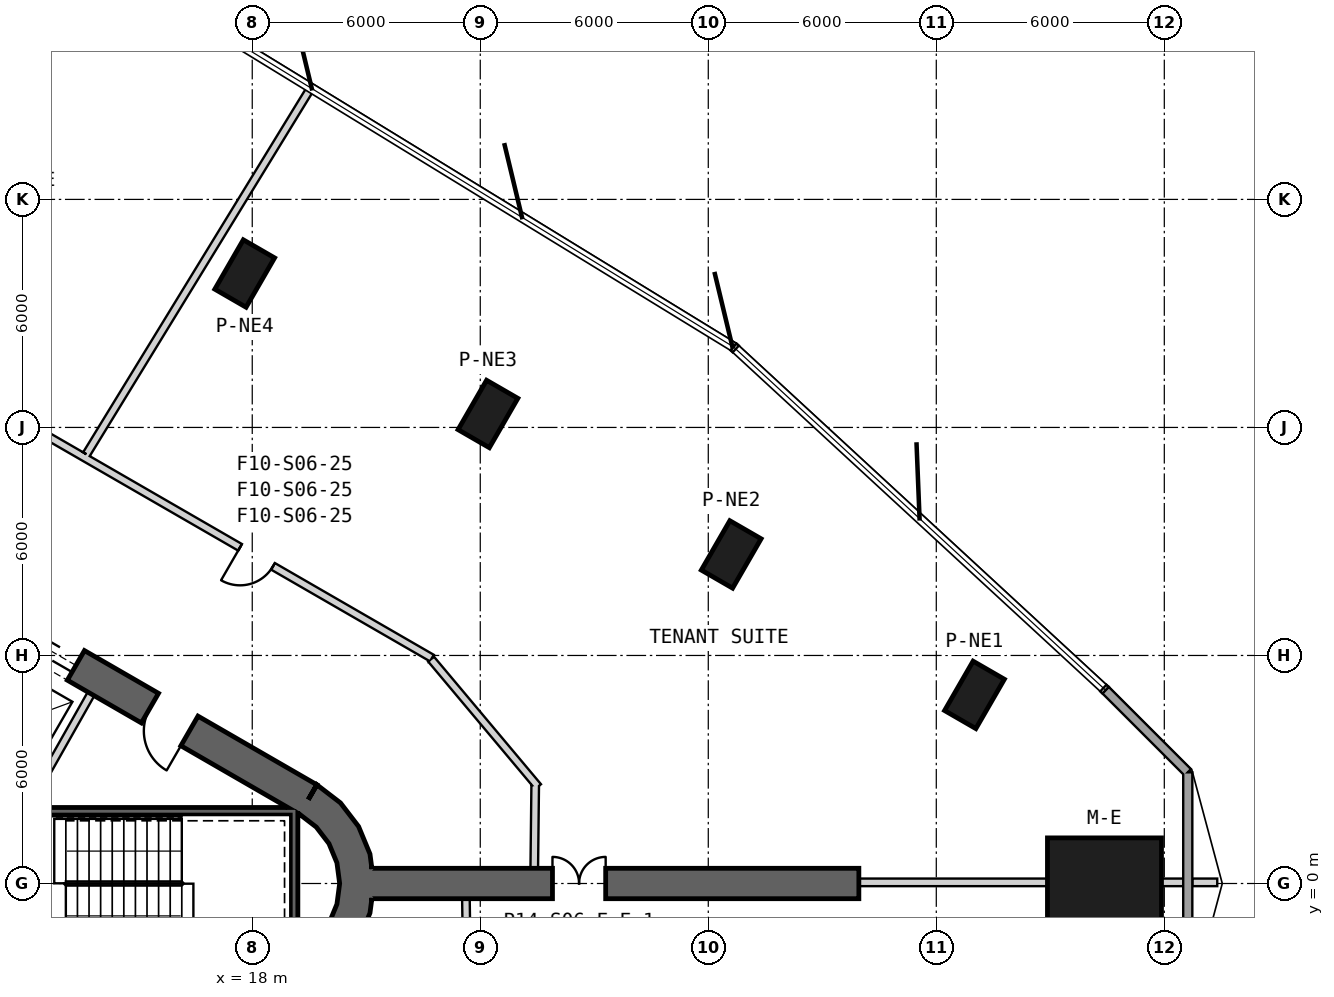
"""IFC4 building model, lengths in metres.
Left out: names, types, materials, properties, quantities, classifications, styles, units other than length and angle.
Written with IfcOpenShell. Run it as: python <this file> out.ifc"""

import sys

from ifc_helpers import new_model, si_unit, direction, frame, frame_2d, origin, origin_2d, place, context, subcontext, project, spatial, polyline, rectangle, outline, extrude, element, fill, save


model = new_model("IFC4")
c1 = context("Model", 3, precision=1e-05, world=origin(), true_north=direction((0.0, 1.0)))
c2 = subcontext(c1, "Body", "Model", "MODEL_VIEW")
j1 = project(units=[si_unit("LENGTHUNIT", "METRE"), si_unit("PLANEANGLEUNIT", "RADIAN")], contexts=[c1])
p1 = place(None, origin())
s1 = spatial("IfcSite", under=j1, at=p1, CompositionType="ELEMENT")
p2 = place(p1, origin())
s2 = spatial("IfcBuilding", under=s1, at=p2, CompositionType="ELEMENT")
p3 = place(p2, frame((0.0, 0.0, 119.3)))
s3 = spatial("IfcBuildingStorey", under=s2, at=p3, CompositionType="ELEMENT", Elevation=119.3)
p4 = place(p3, frame((40.425, 0.0, 0.0), z_axis=(0.0, 0.0, 1.0), x_axis=(1.0, 0.0, 0.0)))
e1 = element("IfcColumn", 1, at=p4, inside=s3, PredefinedType="COLUMN", context=c2, shape_type="SweptSolid", body=[
    extrude(rectangle(XDim=3.0, YDim=2.4, at=origin_2d()), origin(), (0.0, 0.0, 1.0), 4.1),
])
for number, where, z_axis, x_axis in (
    (2, (37.005, 4.963, 0.0), (0.0, 0.0, 1.0), (0.5, 0.866, 0.0)),
    (3, (30.604, 8.658, 0.0), (0.0, 0.0, 1.0), (0.5, 0.866, 0.0)),
    (4, (24.202, 12.354, 0.0), (0.0, 0.0, 1.0), (0.5, 0.866, 0.0)),
    (5, (17.801, 16.05, 0.0), (0.0, 0.0, 1.0), (0.5, 0.866, 0.0)),
):
    element("IfcColumn", number, at=place(p3, frame(where, z_axis=z_axis, x_axis=x_axis)), inside=s3, PredefinedType="COLUMN", context=c2, shape_type="SweptSolid", body=[
        extrude(rectangle(XDim=1.5, YDim=0.95, at=origin_2d()), origin(), (0.0, 0.0, 1.0), 4.1),
    ])
p5 = place(p3, frame((19.475, 2.208, 0.0), z_axis=(0.0, 0.0, 1.0), x_axis=(-0.866028369851, 0.499994862586, 0.0)))
e6 = element("IfcWall", 6, at=p5, inside=s3, PredefinedType="SHEAR", context=c2, shape_type="SweptSolid", body=[
    extrude(rectangle(XDim=31.523, YDim=0.9, at=frame_2d((15.762, 0.0))), origin(), (0.0, 0.0, 1.0), 4.1),
])
p6 = place(p5, frame((7.062, 0.0, 0.0)))
e7 = element("IfcOpeningElement", 7, at=p6, cuts=e6, PredefinedType="OPENING", context=c2, shape_type="SweptSolid", body=[
    extrude(rectangle(XDim=1.2, YDim=2.4, at=frame_2d((0.6, 1.2))), frame((0.0, 0.46, 0.0), z_axis=(0.0, -1.0, 0.0), x_axis=(1.0, 0.0, 0.0)), (0.0, 0.0, 1.0), 0.92),
])
p7 = place(p5, frame((9.762, 0.0, 0.0)))
e8 = element("IfcOpeningElement", 8, at=p7, cuts=e6, PredefinedType="OPENING", context=c2, shape_type="SweptSolid", body=[
    extrude(rectangle(XDim=1.2, YDim=2.4, at=frame_2d((0.6, 1.2))), frame((0.0, 0.46, 0.0), z_axis=(0.0, -1.0, 0.0), x_axis=(1.0, 0.0, 0.0)), (0.0, 0.0, 1.0), 0.92),
])
p8 = place(p5, frame((12.462, 0.0, 0.0)))
e9 = element("IfcOpeningElement", 9, at=p8, cuts=e6, PredefinedType="OPENING", context=c2, shape_type="SweptSolid", body=[
    extrude(rectangle(XDim=1.2, YDim=2.4, at=frame_2d((0.6, 1.2))), frame((0.0, 0.46, 0.0), z_axis=(0.0, -1.0, 0.0), x_axis=(1.0, 0.0, 0.0)), (0.0, 0.0, 1.0), 0.92),
])
p9 = place(p5, frame((15.162, 0.0, 0.0)))
e10 = element("IfcOpeningElement", 10, at=p9, cuts=e6, PredefinedType="OPENING", context=c2, shape_type="SweptSolid", body=[
    extrude(rectangle(XDim=1.2, YDim=2.4, at=frame_2d((0.6, 1.2))), frame((0.0, 0.46, 0.0), z_axis=(0.0, -1.0, 0.0), x_axis=(1.0, 0.0, 0.0)), (0.0, 0.0, 1.0), 0.92),
])
p10 = place(p5, frame((17.862, 0.0, 0.0)))
e11 = element("IfcOpeningElement", 11, at=p10, cuts=e6, PredefinedType="OPENING", context=c2, shape_type="SweptSolid", body=[
    extrude(rectangle(XDim=1.2, YDim=2.4, at=frame_2d((0.6, 1.2))), frame((0.0, 0.46, 0.0), z_axis=(0.0, -1.0, 0.0), x_axis=(1.0, 0.0, 0.0)), (0.0, 0.0, 1.0), 0.92),
])
p11 = place(p5, frame((20.562, 0.0, 0.0)))
e12 = element("IfcOpeningElement", 12, at=p11, cuts=e6, PredefinedType="OPENING", context=c2, shape_type="SweptSolid", body=[
    extrude(rectangle(XDim=1.2, YDim=2.4, at=frame_2d((0.6, 1.2))), frame((0.0, 0.46, 0.0), z_axis=(0.0, -1.0, 0.0), x_axis=(1.0, 0.0, 0.0)), (0.0, 0.0, 1.0), 0.92),
])
p12 = place(p5, frame((23.262, 0.0, 0.0)))
e13 = element("IfcOpeningElement", 13, at=p12, cuts=e6, PredefinedType="OPENING", context=c2, shape_type="SweptSolid", body=[
    extrude(rectangle(XDim=1.2, YDim=2.4, at=frame_2d((0.6, 1.2))), frame((0.0, 0.46, 0.0), z_axis=(0.0, -1.0, 0.0), x_axis=(1.0, 0.0, 0.0)), (0.0, 0.0, 1.0), 0.92),
])
p13 = place(p5, frame((3.612, 0.0, 0.0)))
e14 = element("IfcOpeningElement", 14, at=p13, cuts=e6, PredefinedType="OPENING", context=c2, shape_type="SweptSolid", body=[
    extrude(rectangle(XDim=1.2, YDim=2.4, at=frame_2d((0.6, 1.2))), frame((0.0, 0.46, 0.0), z_axis=(0.0, -1.0, 0.0), x_axis=(1.0, 0.0, 0.0)), (0.0, 0.0, 1.0), 0.92),
])
p14 = place(p5, frame((26.712, 0.0, 0.0)))
e15 = element("IfcOpeningElement", 15, at=p14, cuts=e6, PredefinedType="OPENING", context=c2, shape_type="SweptSolid", body=[
    extrude(rectangle(XDim=1.2, YDim=2.4, at=frame_2d((0.6, 1.2))), frame((0.0, 0.46, 0.0), z_axis=(0.0, -1.0, 0.0), x_axis=(1.0, 0.0, 0.0)), (0.0, 0.0, 1.0), 0.92),
])
p15 = place(p3, origin())
e16 = element("IfcWall", 16, at=p15, inside=s3, PredefinedType="SHEAR", context=c2, shape_type="SweptSolid", body=[
    extrude(outline(polyline([(19.7, -2.598), (20.321, -2.121), (20.798, -1.5), (21.098, -0.777), (21.2, 0.0), (21.098, 0.777), (20.798, 1.5), (20.321, 2.121), (19.7, 2.598), (19.25, 1.819), (19.685, 1.485), (20.019, 1.05), (20.229, 0.543), (20.3, 0.0), (20.229, -0.543), (20.019, -1.05), (19.685, -1.485), (19.25, -1.819), (19.7, -2.598)])), origin(), (0.0, 0.0, 1.0), 4.1),
])
p16 = place(p3, frame((21.15, 0.0, 0.0), z_axis=(0.0, 0.0, 1.0), x_axis=(1.0, 0.0, 0.0)))
e17 = element("IfcWall", 17, at=p16, inside=s3, PredefinedType="SHEAR", context=c2, shape_type="SweptSolid", body=[
    extrude(rectangle(XDim=12.812, YDim=0.8, at=frame_2d((6.406, 0.0))), origin(), (0.0, 0.0, 1.0), 4.1),
])
p17 = place(p16, frame((4.75, 0.0, 0.0)))
e18 = element("IfcOpeningElement", 18, at=p17, cuts=e17, PredefinedType="OPENING", context=c2, shape_type="SweptSolid", body=[
    extrude(rectangle(XDim=1.4, YDim=2.4, at=frame_2d((0.7, 1.2))), frame((0.0, 0.41, 0.0), z_axis=(0.0, -1.0, 0.0), x_axis=(1.0, 0.0, 0.0)), (0.0, 0.0, 1.0), 0.82),
])
p18 = place(p3, frame((42.617, -2.925, 0.0), z_axis=(0.0, 0.0, 1.0), x_axis=(0.0, 1.0, 0.0)))
e19 = element("IfcWall", 19, at=p18, inside=s3, PredefinedType="SOLIDWALL", context=c2, shape_type="SweptSolid", body=[
    extrude(rectangle(XDim=5.851, YDim=0.24, at=frame_2d((2.925, 0.0))), origin(), (0.0, 0.0, 1.0), 3.8),
])
p19 = place(p3, frame((42.617, 2.925, 0.0), z_axis=(0.0, 0.0, 1.0), x_axis=(-0.707106781187, 0.707106781187, 0.0)))
e20 = element("IfcWall", 20, at=p19, inside=s3, PredefinedType="SOLIDWALL", context=c2, shape_type="SweptSolid", body=[
    extrude(rectangle(XDim=3.058, YDim=0.24, at=frame_2d((1.529, 0.0))), origin(), (0.0, 0.0, 1.0), 3.8),
])
p20 = place(p3, frame((12.11, 2.073, 0.0), z_axis=(0.0, 0.0, 1.0), x_axis=(0.49196600604, 0.870614408852, 0.0)))
e21 = element("IfcWall", 21, at=p20, inside=s3, PredefinedType="PLUMBINGWALL", context=c2, shape_type="SweptSolid", body=[
    extrude(rectangle(XDim=3.35, YDim=0.2, at=frame_2d((1.675, 0.0))), origin(), (0.0, 0.0, 1.0), 3.8),
])
p21 = place(p3, frame((19.2, 1.9, -0.3), z_axis=(0.0, 0.0, 1.0), x_axis=(-1.0, 0.0, 0.0)))
e22 = element("IfcWall", 22, at=p21, inside=s3, PredefinedType="SHEAR", context=c2, shape_type="SweptSolid", body=[
    extrude(rectangle(XDim=8.1, YDim=0.2, at=frame_2d((4.05, 0.0))), origin(), (0.0, 0.0, 1.0), 4.1),
])
p22 = place(p3, frame((19.1, -2.0, -0.3), z_axis=(0.0, 0.0, 1.0), x_axis=(0.0, 1.0, 0.0)))
e23 = element("IfcWall", 23, at=p22, inside=s3, PredefinedType="SHEAR", context=c2, shape_type="SweptSolid", body=[
    extrude(rectangle(XDim=3.8, YDim=0.2, at=frame_2d((1.9, 0.0))), origin(), (0.0, 0.0, 1.0), 4.1),
])
p23 = place(p3, frame((22.727, 5.931, 0.0), z_axis=(0.0, 0.0, 1.0), x_axis=(-0.866024609098, 0.500001376435, 0.0)))
e24 = element("IfcWall", 24, at=p23, inside=s3, PredefinedType="PARTITIONING", context=c2, shape_type="SweptSolid", body=[
    extrude(rectangle(XDim=26.847, YDim=0.2, at=frame_2d((13.424, 0.0))), origin(), (0.0, 0.0, 1.0), 2.98),
])
p24 = place(p23, frame((16.578, 0.0, 0.0)))
e25 = element("IfcOpeningElement", 25, at=p24, cuts=e24, PredefinedType="OPENING", context=c2, shape_type="SweptSolid", body=[
    extrude(rectangle(XDim=1.0, YDim=2.1, at=frame_2d((0.5, 1.05))), frame((0.0, 0.11, 0.0), z_axis=(0.0, -1.0, 0.0), x_axis=(1.0, 0.0, 0.0)), (0.0, 0.0, 1.0), 0.22),
])
p25 = place(p23, frame((4.829, 0.0, 0.0)))
e26 = element("IfcOpeningElement", 26, at=p25, cuts=e24, PredefinedType="OPENING", context=c2, shape_type="SweptSolid", body=[
    extrude(rectangle(XDim=1.0, YDim=2.1, at=frame_2d((0.5, 1.05))), frame((0.0, 0.11, 0.0), z_axis=(0.0, -1.0, 0.0), x_axis=(1.0, 0.0, 0.0)), (0.0, 0.0, 1.0), 0.22),
])
p26 = place(p3, frame((25.521, 2.548, 0.0), z_axis=(0.0, 0.0, 1.0), x_axis=(-0.642784253626, 0.766047259176, 0.0)))
e27 = element("IfcWall", 27, at=p26, inside=s3, PredefinedType="PARTITIONING", context=c2, shape_type="SweptSolid", body=[
    extrude(rectangle(XDim=4.381, YDim=0.2, at=frame_2d((2.19, 0.0))), origin(), (0.0, 0.0, 1.0), 2.88),
])
p27 = place(p3, frame((25.421, 0.4, 0.0), z_axis=(0.0, 0.0, 1.0), x_axis=(0.011376843137, 0.999935281626, 0.0)))
e28 = element("IfcWall", 28, at=p27, inside=s3, PredefinedType="PARTITIONING", context=c2, shape_type="SweptSolid", body=[
    extrude(rectangle(XDim=2.189, YDim=0.2, at=frame_2d((1.094, 0.0))), origin(), (0.0, 0.0, 1.0), 3.8),
])
p28 = place(p3, frame((23.648, -2.098, 0.0), z_axis=(0.0, 0.0, 1.0), x_axis=(-0.015095332307, 0.99988605898, 0.0)))
e29 = element("IfcWall", 29, at=p28, inside=s3, PredefinedType="PARTITIONING", context=c2, shape_type="SweptSolid", body=[
    extrude(rectangle(XDim=1.698, YDim=0.2, at=frame_2d((0.849, 0.0))), origin(), (0.0, 0.0, 1.0), 3.8),
])
p29 = place(p3, frame((19.541, 20.933, 0.0), z_axis=(0.0, 0.0, 1.0), x_axis=(-0.522401997829, -0.852699333097, 0.0)))
e30 = element("IfcWall", 30, at=p29, inside=s3, PredefinedType="PARTITIONING", context=c2, shape_type="SweptSolid", body=[
    extrude(rectangle(XDim=11.303, YDim=0.2, at=frame_2d((5.652, 0.0))), origin(), (0.0, 0.0, 1.0), 3.08),
])
p30 = place(p3, frame((43.393, 0.03, 0.0), z_axis=(0.0, 0.0, 1.0), x_axis=(-1.0, 0.0, 0.0)))
e31 = element("IfcWall", 31, at=p30, inside=s3, PredefinedType="PARTITIONING", context=c2, shape_type="SweptSolid", body=[
    extrude(rectangle(XDim=0.656, YDim=0.2, at=frame_2d((0.328, 0.0))), origin(), (0.0, 0.0, 1.0), 3.8),
])
p31 = place(p3, frame((42.497, 0.03, 0.0), z_axis=(0.0, 0.0, 1.0), x_axis=(-1.0, 0.0, 0.0)))
e32 = element("IfcWall", 32, at=p31, inside=s3, PredefinedType="PARTITIONING", context=c2, shape_type="SweptSolid", body=[
    extrude(rectangle(XDim=0.572, YDim=0.2, at=frame_2d((0.286, 0.0))), origin(), (0.0, 0.0, 1.0), 3.8),
])
p32 = place(p3, frame((38.925, 0.03, 0.0), z_axis=(0.0, 0.0, 1.0), x_axis=(-1.0, 0.0, 0.0)))
e33 = element("IfcWall", 33, at=p32, inside=s3, PredefinedType="PARTITIONING", context=c2, shape_type="SweptSolid", body=[
    extrude(rectangle(XDim=4.963, YDim=0.2, at=frame_2d((2.481, 0.0))), origin(), (0.0, 0.0, 1.0), 3.37),
])
p33 = place(p25, origin())
e34 = element("IfcDoor", 34, at=p33, inside=s3, OperationType="SINGLE_SWING_LEFT", PredefinedType="USERDEFINED", context=c2, shape_type="SweptSolid", body=[
    extrude(rectangle(XDim=1.0, YDim=2.1, at=frame_2d((0.5, 1.05))), frame((0.0, 0.025, 0.0), z_axis=(0.0, -1.0, 0.0), x_axis=(1.0, 0.0, 0.0)), (0.0, 0.0, 1.0), 0.05),
])
fill(e26, e34)
p34 = place(p6, origin())
e35 = element("IfcDoor", 35, at=p34, inside=s3, OperationType="SLIDING_TO_LEFT", PredefinedType="USERDEFINED", context=c2, shape_type="SweptSolid", body=[
    extrude(rectangle(XDim=1.2, YDim=2.4, at=frame_2d((0.6, 1.2))), frame((0.0, 0.025, 0.0), z_axis=(0.0, -1.0, 0.0), x_axis=(1.0, 0.0, 0.0)), (0.0, 0.0, 1.0), 0.05),
])
fill(e7, e35)
p35 = place(p13, origin())
e36 = element("IfcDoor", 36, at=p35, inside=s3, OperationType="SINGLE_SWING_RIGHT", PredefinedType="USERDEFINED", context=c2, shape_type="SweptSolid", body=[
    extrude(rectangle(XDim=1.2, YDim=2.4, at=frame_2d((0.6, 1.2))), frame((0.0, 0.025, 0.0), z_axis=(0.0, -1.0, 0.0), x_axis=(1.0, 0.0, 0.0)), (0.0, 0.0, 1.0), 0.05),
])
fill(e14, e36)
p36 = place(p17, origin())
e37 = element("IfcDoor", 37, at=p36, inside=s3, OperationType="DOUBLE_DOOR_SINGLE_SWING", PredefinedType="NOTDEFINED", context=c2, shape_type="SweptSolid", body=[
    extrude(rectangle(XDim=1.4, YDim=2.4, at=frame_2d((0.7, 1.2))), frame((0.0, 0.025, 0.0), z_axis=(0.0, -1.0, 0.0), x_axis=(1.0, 0.0, 0.0)), (0.0, 0.0, 1.0), 0.05),
])
fill(e18, e37)
save(model, sys.argv[1])
